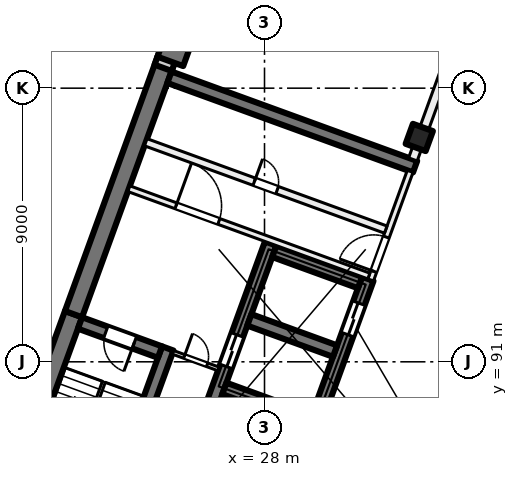
"""IFC4 building model, lengths in metres.
Left out: names, types, materials, properties, quantities, classifications, styles, units other than length and angle.
Written with IfcOpenShell. Run it as: python <this file> out.ifc"""

import sys

from ifc_helpers import new_model, si_unit, direction, frame, frame_2d, origin, origin_2d, place, context, subcontext, project, spatial, rectangle, extrude, element, fill, save


model = new_model("IFC4")
c1 = context("Model", 3, precision=1e-05, world=origin(), true_north=direction((0.0, 1.0)))
c2 = subcontext(c1, "Body", "Model", "MODEL_VIEW")
j1 = project(units=[si_unit("LENGTHUNIT", "METRE"), si_unit("PLANEANGLEUNIT", "RADIAN")], contexts=[c1])
p1 = place(None, origin())
s1 = spatial("IfcSite", under=j1, at=p1, CompositionType="ELEMENT")
p2 = place(p1, origin())
s2 = spatial("IfcBuilding", under=s1, at=p2, CompositionType="ELEMENT")
p3 = place(p2, frame((0.0, 0.0, 67.5)))
s3 = spatial("IfcBuildingStorey", under=s2, at=p3, CompositionType="ELEMENT", Elevation=67.5)
p4 = place(p3, frame((33.091, 98.379, 0.0), z_axis=(0.0, 0.0, 1.0), x_axis=(-0.342020143326, -0.939692620786, 0.0)))
e1 = element("IfcColumn", 1, at=p4, inside=s3, PredefinedType="COLUMN", context=c2, shape_type="SweptSolid", body=[
    extrude(rectangle(XDim=0.7, YDim=0.7, at=origin_2d()), origin(), (0.0, 0.0, 1.0), 4.0),
])
p5 = place(p3, frame((25.056, 101.303, 0.0), z_axis=(0.0, 0.0, 1.0), x_axis=(-0.342020143326, -0.939692620786, 0.0)))
e2 = element("IfcColumn", 2, at=p5, inside=s3, PredefinedType="COLUMN", context=c2, shape_type="SweptSolid", body=[
    extrude(rectangle(XDim=0.9, YDim=0.9, at=origin_2d()), origin(), (0.0, 0.0, 1.0), 4.0),
])
p6 = place(p3, frame((19.05, 85.239, 0.0), z_axis=(0.0, 0.0, 1.0), x_axis=(0.342016982193, 0.939693771338, 0.0)))
e3 = element("IfcWall", 3, at=p6, inside=s3, PredefinedType="SHEAR", context=c2, shape_type="SweptSolid", body=[
    extrude(rectangle(XDim=7.8, YDim=0.6, at=frame_2d((3.9, 0.0))), origin(), (0.0, 0.0, 1.0), 4.0),
])
p7 = place(p3, frame((21.717, 92.568, 0.0), z_axis=(0.0, 0.0, 1.0), x_axis=(0.342016162452, 0.939694069696, 0.0)))
e4 = element("IfcWall", 4, at=p7, inside=s3, PredefinedType="SHEAR", context=c2, shape_type="SweptSolid", body=[
    extrude(rectangle(XDim=8.9, YDim=0.6, at=frame_2d((4.45, 0.0))), origin(), (0.0, 0.0, 1.0), 4.0),
])
p8 = place(p3, frame((22.15, 84.11, 0.0), z_axis=(0.0, 0.0, 1.0), x_axis=(0.342016982193, 0.939693771338, 0.0)))
e5 = element("IfcWall", 5, at=p8, inside=s3, PredefinedType="SHEAR", context=c2, shape_type="SweptSolid", body=[
    extrude(rectangle(XDim=7.8, YDim=0.4, at=frame_2d((3.9, 0.0))), origin(), (0.0, 0.0, 1.0), 4.0),
])
p9 = place(p3, frame((24.562, 91.32, 0.0), z_axis=(0.0, 0.0, 1.0), x_axis=(-0.939717030584, 0.341953070509, 0.0)))
e6 = element("IfcWall", 6, at=p9, inside=s3, PredefinedType="SHEAR", context=c2, shape_type="SweptSolid", body=[
    extrude(rectangle(XDim=2.8, YDim=0.4, at=frame_2d((1.4, 0.0))), origin(), (0.0, 0.0, 1.0), 4.0),
])
p10 = place(p9, frame((0.9, 0.0, 0.0)))
e7 = element("IfcOpeningElement", 7, at=p10, cuts=e6, PredefinedType="OPENING", context=c2, shape_type="SweptSolid", body=[
    extrude(rectangle(XDim=1.0, YDim=2.1, at=frame_2d((0.5, 1.05))), frame((0.0, 0.21, 0.0), z_axis=(0.0, -1.0, 0.0), x_axis=(1.0, 0.0, 0.0)), (0.0, 0.0, 1.0), 0.42),
])
p11 = place(p3, frame((30.984, 80.895, 0.0), z_axis=(0.0, 0.0, 1.0), x_axis=(0.342021021735, 0.939692301071, 0.0)))
e8 = element("IfcWall", 8, at=p11, inside=s3, PredefinedType="SHEAR", context=c2, shape_type="SweptSolid", body=[
    extrude(rectangle(XDim=12.2, YDim=0.4, at=frame_2d((6.1, 0.0))), origin(), (0.0, 0.0, 1.0), 4.0),
])
p12 = place(p11, frame((5.45, 0.0, 0.0)))
e9 = element("IfcOpeningElement", 9, at=p12, cuts=e8, PredefinedType="OPENING", context=c2, shape_type="SweptSolid", body=[
    extrude(rectangle(XDim=1.1, YDim=2.1, at=frame_2d((0.55, 1.05))), frame((0.0, 0.21, 0.0), z_axis=(0.0, -1.0, 0.0), x_axis=(1.0, 0.0, 0.0)), (0.0, 0.0, 1.0), 0.42),
])
p13 = place(p11, frame((7.85, 0.0, 0.0)))
e10 = element("IfcOpeningElement", 10, at=p13, cuts=e8, PredefinedType="OPENING", context=c2, shape_type="SweptSolid", body=[
    extrude(rectangle(XDim=1.1, YDim=2.1, at=frame_2d((0.55, 1.05))), frame((0.0, 0.21, 0.0), z_axis=(0.0, -1.0, 0.0), x_axis=(1.0, 0.0, 0.0)), (0.0, 0.0, 1.0), 0.42),
])
p14 = place(p11, frame((10.25, 0.0, 0.0)))
e11 = element("IfcOpeningElement", 11, at=p14, cuts=e8, PredefinedType="OPENING", context=c2, shape_type="SweptSolid", body=[
    extrude(rectangle(XDim=1.1, YDim=2.1, at=frame_2d((0.55, 1.05))), frame((0.0, 0.21, 0.0), z_axis=(0.0, -1.0, 0.0), x_axis=(1.0, 0.0, 0.0)), (0.0, 0.0, 1.0), 0.42),
])
p15 = place(p3, frame((27.225, 82.263, 0.0), z_axis=(0.0, 0.0, 1.0), x_axis=(0.342014590177, 0.939694641948, 0.0)))
e12 = element("IfcWall", 12, at=p15, inside=s3, PredefinedType="SHEAR", context=c2, shape_type="SweptSolid", body=[
    extrude(rectangle(XDim=12.2, YDim=0.4, at=frame_2d((6.1, 0.0))), origin(), (0.0, 0.0, 1.0), 4.0),
])
p16 = place(p15, frame((10.25, 0.0, 0.0)))
e13 = element("IfcOpeningElement", 13, at=p16, cuts=e12, PredefinedType="OPENING", context=c2, shape_type="SweptSolid", body=[
    extrude(rectangle(XDim=1.1, YDim=2.1, at=frame_2d((0.55, 1.05))), frame((0.0, 0.21, 0.0), z_axis=(0.0, -1.0, 0.0), x_axis=(1.0, 0.0, 0.0)), (0.0, 0.0, 1.0), 0.42),
])
p17 = place(p15, frame((0.7, 0.0, 0.0)))
e14 = element("IfcOpeningElement", 14, at=p17, cuts=e12, PredefinedType="OPENING", context=c2, shape_type="SweptSolid", body=[
    extrude(rectangle(XDim=0.8, YDim=2.1, at=frame_2d((0.4, 1.05))), frame((0.0, 0.21, 0.0), z_axis=(0.0, -1.0, 0.0), x_axis=(1.0, 0.0, 0.0)), (0.0, 0.0, 1.0), 0.42),
])
p18 = place(p3, frame((24.03, 83.426, 0.0), z_axis=(0.0, 0.0, 1.0), x_axis=(0.342014590177, 0.939694641948, 0.0)))
e15 = element("IfcWall", 15, at=p18, inside=s3, PredefinedType="SHEAR", context=c2, shape_type="SweptSolid", body=[
    extrude(rectangle(XDim=12.2, YDim=0.4, at=frame_2d((6.1, 0.0))), origin(), (0.0, 0.0, 1.0), 4.0),
])
p19 = place(p18, frame((7.9, 0.0, 0.0)))
e16 = element("IfcOpeningElement", 16, at=p19, cuts=e15, PredefinedType="OPENING", context=c2, shape_type="SweptSolid", body=[
    extrude(rectangle(XDim=1.1, YDim=2.1, at=frame_2d((0.55, 1.05))), frame((0.0, 0.21, 0.0), z_axis=(0.0, -1.0, 0.0), x_axis=(1.0, 0.0, 0.0)), (0.0, 0.0, 1.0), 0.42),
])
for number, where, z_axis, x_axis in (
    (17, (29.5, 89.097, 0.0), (0.0, 0.0, 1.0), (-0.94, 0.342, 0.0)),
    (18, (30.32, 91.353, 0.0), (0.0, 0.0, 1.0), (-0.94, 0.342, 0.0)),
    (19, (31.141, 93.608, 0.0), (0.0, 0.0, 1.0), (-0.94, 0.342, 0.0)),
):
    element("IfcWall", number, at=place(p3, frame(where, z_axis=z_axis, x_axis=x_axis)), inside=s3, PredefinedType="SHEAR", context=c2, shape_type="SweptSolid", body=[
        extrude(rectangle(XDim=3.0, YDim=0.4, at=frame_2d((1.5, 0.0))), origin(), (0.0, 0.0, 1.0), 4.0),
    ])
p20 = place(p3, frame((32.953, 97.418, 0.0), z_axis=(0.0, 0.0, 1.0), x_axis=(-0.93969060187, 0.342025690201, 0.0)))
e20 = element("IfcWall", 20, at=p20, inside=s3, PredefinedType="SHEAR", context=c2, shape_type="SweptSolid", body=[
    extrude(rectangle(XDim=8.6, YDim=0.4, at=frame_2d((4.3, 0.0))), origin(), (0.0, 0.0, 1.0), 4.0),
])
p21 = place(p3, frame((24.666, 100.669, 0.0), z_axis=(0.0, 0.0, 1.0), x_axis=(0.34201964167, 0.939692803373, 0.0)))
e21 = element("IfcWall", 21, at=p21, inside=s3, PredefinedType="SOLIDWALL", context=c2, shape_type="SweptSolid", body=[
    extrude(rectangle(XDim=32.884, YDim=0.6, at=frame_2d((16.442, 0.0))), origin(), (0.0, 0.0, 1.0), 3.625),
])
p22 = place(p21, frame((1.48, 0.0, 0.9)))
e22 = element("IfcOpeningElement", 22, at=p22, cuts=e21, PredefinedType="OPENING", context=c2, shape_type="SweptSolid", body=[
    extrude(rectangle(XDim=3.0, YDim=2.4, at=frame_2d((1.5, 1.2))), frame((0.0, 0.31, 0.0), z_axis=(0.0, -1.0, 0.0), x_axis=(1.0, 0.0, 0.0)), (0.0, 0.0, 1.0), 0.62),
])
p23 = place(p21, frame((5.98, 0.0, 0.9)))
e23 = element("IfcOpeningElement", 23, at=p23, cuts=e21, PredefinedType="OPENING", context=c2, shape_type="SweptSolid", body=[
    extrude(rectangle(XDim=3.0, YDim=2.4, at=frame_2d((1.5, 1.2))), frame((0.0, 0.31, 0.0), z_axis=(0.0, -1.0, 0.0), x_axis=(1.0, 0.0, 0.0)), (0.0, 0.0, 1.0), 0.62),
])
p24 = place(p21, frame((11.08, 0.0, 0.0)))
e24 = element("IfcOpeningElement", 24, at=p24, cuts=e21, PredefinedType="OPENING", context=c2, shape_type="SweptSolid", body=[
    extrude(rectangle(XDim=1.8, YDim=2.4, at=frame_2d((0.9, 1.2))), frame((0.0, 0.31, 0.0), z_axis=(0.0, -1.0, 0.0), x_axis=(1.0, 0.0, 0.0)), (0.0, 0.0, 1.0), 0.62),
])
p25 = place(p21, frame((14.98, 0.0, 0.9)))
e25 = element("IfcOpeningElement", 25, at=p25, cuts=e21, PredefinedType="OPENING", context=c2, shape_type="SweptSolid", body=[
    extrude(rectangle(XDim=3.0, YDim=2.4, at=frame_2d((1.5, 1.2))), frame((0.0, 0.31, 0.0), z_axis=(0.0, -1.0, 0.0), x_axis=(1.0, 0.0, 0.0)), (0.0, 0.0, 1.0), 0.62),
])
p26 = place(p21, frame((19.48, 0.0, 0.9)))
e26 = element("IfcOpeningElement", 26, at=p26, cuts=e21, PredefinedType="OPENING", context=c2, shape_type="SweptSolid", body=[
    extrude(rectangle(XDim=3.0, YDim=2.4, at=frame_2d((1.5, 1.2))), frame((0.0, 0.31, 0.0), z_axis=(0.0, -1.0, 0.0), x_axis=(1.0, 0.0, 0.0)), (0.0, 0.0, 1.0), 0.62),
])
p27 = place(p21, frame((24.58, 0.0, 0.0)))
e27 = element("IfcOpeningElement", 27, at=p27, cuts=e21, PredefinedType="OPENING", context=c2, shape_type="SweptSolid", body=[
    extrude(rectangle(XDim=1.8, YDim=2.4, at=frame_2d((0.9, 1.2))), frame((0.0, 0.31, 0.0), z_axis=(0.0, -1.0, 0.0), x_axis=(1.0, 0.0, 0.0)), (0.0, 0.0, 1.0), 0.62),
])
p28 = place(p21, frame((28.48, 0.0, 0.9)))
e28 = element("IfcOpeningElement", 28, at=p28, cuts=e21, PredefinedType="OPENING", context=c2, shape_type="SweptSolid", body=[
    extrude(rectangle(XDim=3.0, YDim=2.4, at=frame_2d((1.5, 1.2))), frame((0.0, 0.31, 0.0), z_axis=(0.0, -1.0, 0.0), x_axis=(1.0, 0.0, 0.0)), (0.0, 0.0, 1.0), 0.62),
])
p29 = place(p3, frame((31.491, 93.693, 0.0), z_axis=(0.0, 0.0, 1.0), x_axis=(0.341995824804, 0.939701471648, 0.0)))
e29 = element("IfcWall", 29, at=p29, inside=s3, PredefinedType="PARTITIONING", context=c2, shape_type="SweptSolid", body=[
    extrude(rectangle(XDim=3.8, YDim=0.2, at=frame_2d((1.9, 0.0))), origin(), (0.0, 0.0, 1.0), 3.625),
])
p30 = place(p29, frame((0.3, 0.0, 0.0)))
e30 = element("IfcOpeningElement", 30, at=p30, cuts=e29, PredefinedType="OPENING", context=c2, shape_type="SweptSolid", body=[
    extrude(rectangle(XDim=1.2, YDim=2.1, at=frame_2d((0.6, 1.05))), frame((0.0, 0.11, 0.0), z_axis=(0.0, -1.0, 0.0), x_axis=(1.0, 0.0, 0.0)), (0.0, 0.0, 1.0), 0.22),
])
p31 = place(p3, frame((23.538, 96.694, 0.0), z_axis=(0.0, 0.0, 1.0), x_axis=(0.939691552312, -0.342023078919, 0.0)))
e31 = element("IfcWall", 31, at=p31, inside=s3, PredefinedType="PARTITIONING", context=c2, shape_type="SweptSolid", body=[
    extrude(rectangle(XDim=8.4, YDim=0.2, at=frame_2d((4.2, 0.0))), origin(), (0.0, 0.0, 1.0), 3.625),
])
p32 = place(p31, frame((1.65, 0.0, 0.0)))
e32 = element("IfcOpeningElement", 32, at=p32, cuts=e31, PredefinedType="OPENING", context=c2, shape_type="SweptSolid", body=[
    extrude(rectangle(XDim=1.5, YDim=2.1, at=frame_2d((0.75, 1.05))), frame((0.0, 0.11, 0.0), z_axis=(0.0, -1.0, 0.0), x_axis=(1.0, 0.0, 0.0)), (0.0, 0.0, 1.0), 0.22),
])
p33 = place(p3, frame((24.094, 98.221, 0.0), z_axis=(0.0, 0.0, 1.0), x_axis=(0.939691552312, -0.342023078919, 0.0)))
e33 = element("IfcWall", 33, at=p33, inside=s3, PredefinedType="PARTITIONING", context=c2, shape_type="SweptSolid", body=[
    extrude(rectangle(XDim=8.4, YDim=0.25, at=frame_2d((4.2, 0.0))), origin(), (0.0, 0.0, 1.0), 3.625),
])
p34 = place(p33, frame((3.8, 0.0, 0.0)))
e34 = element("IfcOpeningElement", 34, at=p34, cuts=e33, PredefinedType="OPENING", context=c2, shape_type="SweptSolid", body=[
    extrude(rectangle(XDim=0.8, YDim=2.1, at=frame_2d((0.4, 1.05))), frame((0.0, 0.135, 0.0), z_axis=(0.0, -1.0, 0.0), x_axis=(1.0, 0.0, 0.0)), (0.0, 0.0, 1.0), 0.27),
])
p35 = place(p3, frame((24.985, 91.312, 0.0), z_axis=(0.0, 0.0, 1.0), x_axis=(0.939708740826, -0.341975850632, 0.0)))
e35 = element("IfcWall", 35, at=p35, inside=s3, PredefinedType="PARTITIONING", context=c2, shape_type="SweptSolid", body=[
    extrude(rectangle(XDim=1.6, YDim=0.125, at=frame_2d((0.8, 0.0))), origin(), (0.0, 0.0, 1.0), 3.625),
])
p36 = place(p35, frame((0.4, 0.0, 0.0)))
e36 = element("IfcOpeningElement", 36, at=p36, cuts=e35, PredefinedType="OPENING", context=c2, shape_type="SweptSolid", body=[
    extrude(rectangle(XDim=0.8, YDim=2.1, at=frame_2d((0.4, 1.05))), frame((0.0, 0.073, 0.0), z_axis=(0.0, -1.0, 0.0), x_axis=(1.0, 0.0, 0.0)), (0.0, 0.0, 1.0), 0.145),
])
p37 = place(p3, frame((32.881, 97.657, 0.0), z_axis=(0.0, 0.0, 1.0), x_axis=(0.342017360004, 0.939693633828, 0.0)))
e37 = element("IfcWall", 37, at=p37, inside=s3, PredefinedType="PARTITIONING", context=c2, shape_type="SweptSolid", body=[
    extrude(rectangle(XDim=34.516, YDim=0.3, at=frame_2d((17.258, 0.0))), origin(), (0.0, 0.0, 1.0), 3.625),
])
p38 = place(p37, frame((6.225, 0.0, 0.0)))
e38 = element("IfcOpeningElement", 38, at=p38, cuts=e37, PredefinedType="OPENING", context=c2, shape_type="SweptSolid", body=[
    extrude(rectangle(XDim=1.8, YDim=2.1, at=frame_2d((0.9, 1.05))), frame((0.0, 0.16, 0.0), z_axis=(0.0, -1.0, 0.0), x_axis=(1.0, 0.0, 0.0)), (0.0, 0.0, 1.0), 0.32),
])
p39 = place(p37, frame((15.9, 0.0, 0.0)))
e39 = element("IfcOpeningElement", 39, at=p39, cuts=e37, PredefinedType="OPENING", context=c2, shape_type="SweptSolid", body=[
    extrude(rectangle(XDim=1.2, YDim=2.1, at=frame_2d((0.6, 1.05))), frame((0.0, 0.16, 0.0), z_axis=(0.0, -1.0, 0.0), x_axis=(1.0, 0.0, 0.0)), (0.0, 0.0, 1.0), 0.32),
])
p40 = place(p37, frame((20.5, 0.0, 0.0)))
e40 = element("IfcOpeningElement", 40, at=p40, cuts=e37, PredefinedType="OPENING", context=c2, shape_type="SweptSolid", body=[
    extrude(rectangle(XDim=1.0, YDim=2.1, at=frame_2d((0.5, 1.05))), frame((0.0, 0.16, 0.0), z_axis=(0.0, -1.0, 0.0), x_axis=(1.0, 0.0, 0.0)), (0.0, 0.0, 1.0), 0.32),
])
p41 = place(p37, frame((25.0, 0.0, 0.0)))
e41 = element("IfcOpeningElement", 41, at=p41, cuts=e37, PredefinedType="OPENING", context=c2, shape_type="SweptSolid", body=[
    extrude(rectangle(XDim=1.0, YDim=2.1, at=frame_2d((0.5, 1.05))), frame((0.0, 0.16, 0.0), z_axis=(0.0, -1.0, 0.0), x_axis=(1.0, 0.0, 0.0)), (0.0, 0.0, 1.0), 0.32),
])
p42 = place(p37, frame((30.562, 0.0, 0.0)))
e42 = element("IfcOpeningElement", 42, at=p42, cuts=e37, PredefinedType="OPENING", context=c2, shape_type="SweptSolid", body=[
    extrude(rectangle(XDim=1.0, YDim=2.1, at=frame_2d((0.5, 1.05))), frame((0.0, 0.16, 0.0), z_axis=(0.0, -1.0, 0.0), x_axis=(1.0, 0.0, 0.0)), (0.0, 0.0, 1.0), 0.32),
])
p43 = place(p16, origin())
e43 = element("IfcDoor", 43, at=p43, inside=s3, OperationType="DOUBLE_DOOR_SLIDING", PredefinedType="DOOR", context=c2, shape_type="SweptSolid", body=[
    extrude(rectangle(XDim=1.1, YDim=2.1, at=frame_2d((0.55, 1.05))), frame((0.0, 0.025, 0.0), z_axis=(0.0, -1.0, 0.0), x_axis=(1.0, 0.0, 0.0)), (0.0, 0.0, 1.0), 0.05),
])
fill(e13, e43)
p44 = place(p30, origin())
e44 = element("IfcDoor", 44, at=p44, inside=s3, OperationType="DOUBLE_DOOR_SINGLE_SWING", PredefinedType="DOOR", context=c2, shape_type="SweptSolid", body=[
    extrude(rectangle(XDim=1.2, YDim=2.1, at=frame_2d((0.6, 1.05))), frame((0.0, 0.025, 0.0), z_axis=(0.0, -1.0, 0.0), x_axis=(1.0, 0.0, 0.0)), (0.0, 0.0, 1.0), 0.05),
])
fill(e30, e44)
p45 = place(p32, origin())
e45 = element("IfcDoor", 45, at=p45, inside=s3, OperationType="DOUBLE_DOOR_SINGLE_SWING", PredefinedType="DOOR", context=c2, shape_type="SweptSolid", body=[
    extrude(rectangle(XDim=1.5, YDim=2.1, at=frame_2d((0.75, 1.05))), frame((0.0, 0.025, 0.0), z_axis=(0.0, -1.0, 0.0), x_axis=(1.0, 0.0, 0.0)), (0.0, 0.0, 1.0), 0.05),
])
fill(e32, e45)
p46 = place(p10, origin())
e46 = element("IfcDoor", 46, at=p46, inside=s3, OperationType="SINGLE_SWING_LEFT", PredefinedType="DOOR", context=c2, shape_type="SweptSolid", body=[
    extrude(rectangle(XDim=1.0, YDim=2.1, at=frame_2d((0.5, 1.05))), frame((0.0, 0.025, 0.0), z_axis=(0.0, -1.0, 0.0), x_axis=(1.0, 0.0, 0.0)), (0.0, 0.0, 1.0), 0.05),
])
fill(e7, e46)
p47 = place(p36, origin())
e47 = element("IfcDoor", 47, at=p47, inside=s3, OperationType="SINGLE_SWING_RIGHT", PredefinedType="DOOR", context=c2, shape_type="SweptSolid", body=[
    extrude(rectangle(XDim=0.8, YDim=2.1, at=frame_2d((0.4, 1.05))), frame((0.0, 0.025, 0.0), z_axis=(0.0, -1.0, 0.0), x_axis=(1.0, 0.0, 0.0)), (0.0, 0.0, 1.0), 0.05),
])
fill(e36, e47)
p48 = place(p34, origin())
e48 = element("IfcDoor", 48, at=p48, inside=s3, OperationType="SINGLE_SWING_LEFT", PredefinedType="DOOR", context=c2, shape_type="SweptSolid", body=[
    extrude(rectangle(XDim=0.8, YDim=2.1, at=frame_2d((0.4, 1.05))), frame((0.0, 0.025, 0.0), z_axis=(0.0, -1.0, 0.0), x_axis=(1.0, 0.0, 0.0)), (0.0, 0.0, 1.0), 0.05),
])
fill(e34, e48)
p49 = place(p19, origin())
e49 = element("IfcDoor", 49, at=p49, inside=s3, OperationType="DOUBLE_DOOR_SLIDING", PredefinedType="DOOR", context=c2, shape_type="SweptSolid", body=[
    extrude(rectangle(XDim=1.1, YDim=2.1, at=frame_2d((0.55, 1.05))), frame((0.0, 0.025, 0.0), z_axis=(0.0, -1.0, 0.0), x_axis=(1.0, 0.0, 0.0)), (0.0, 0.0, 1.0), 0.05),
])
fill(e16, e49)
save(model, sys.argv[1])
